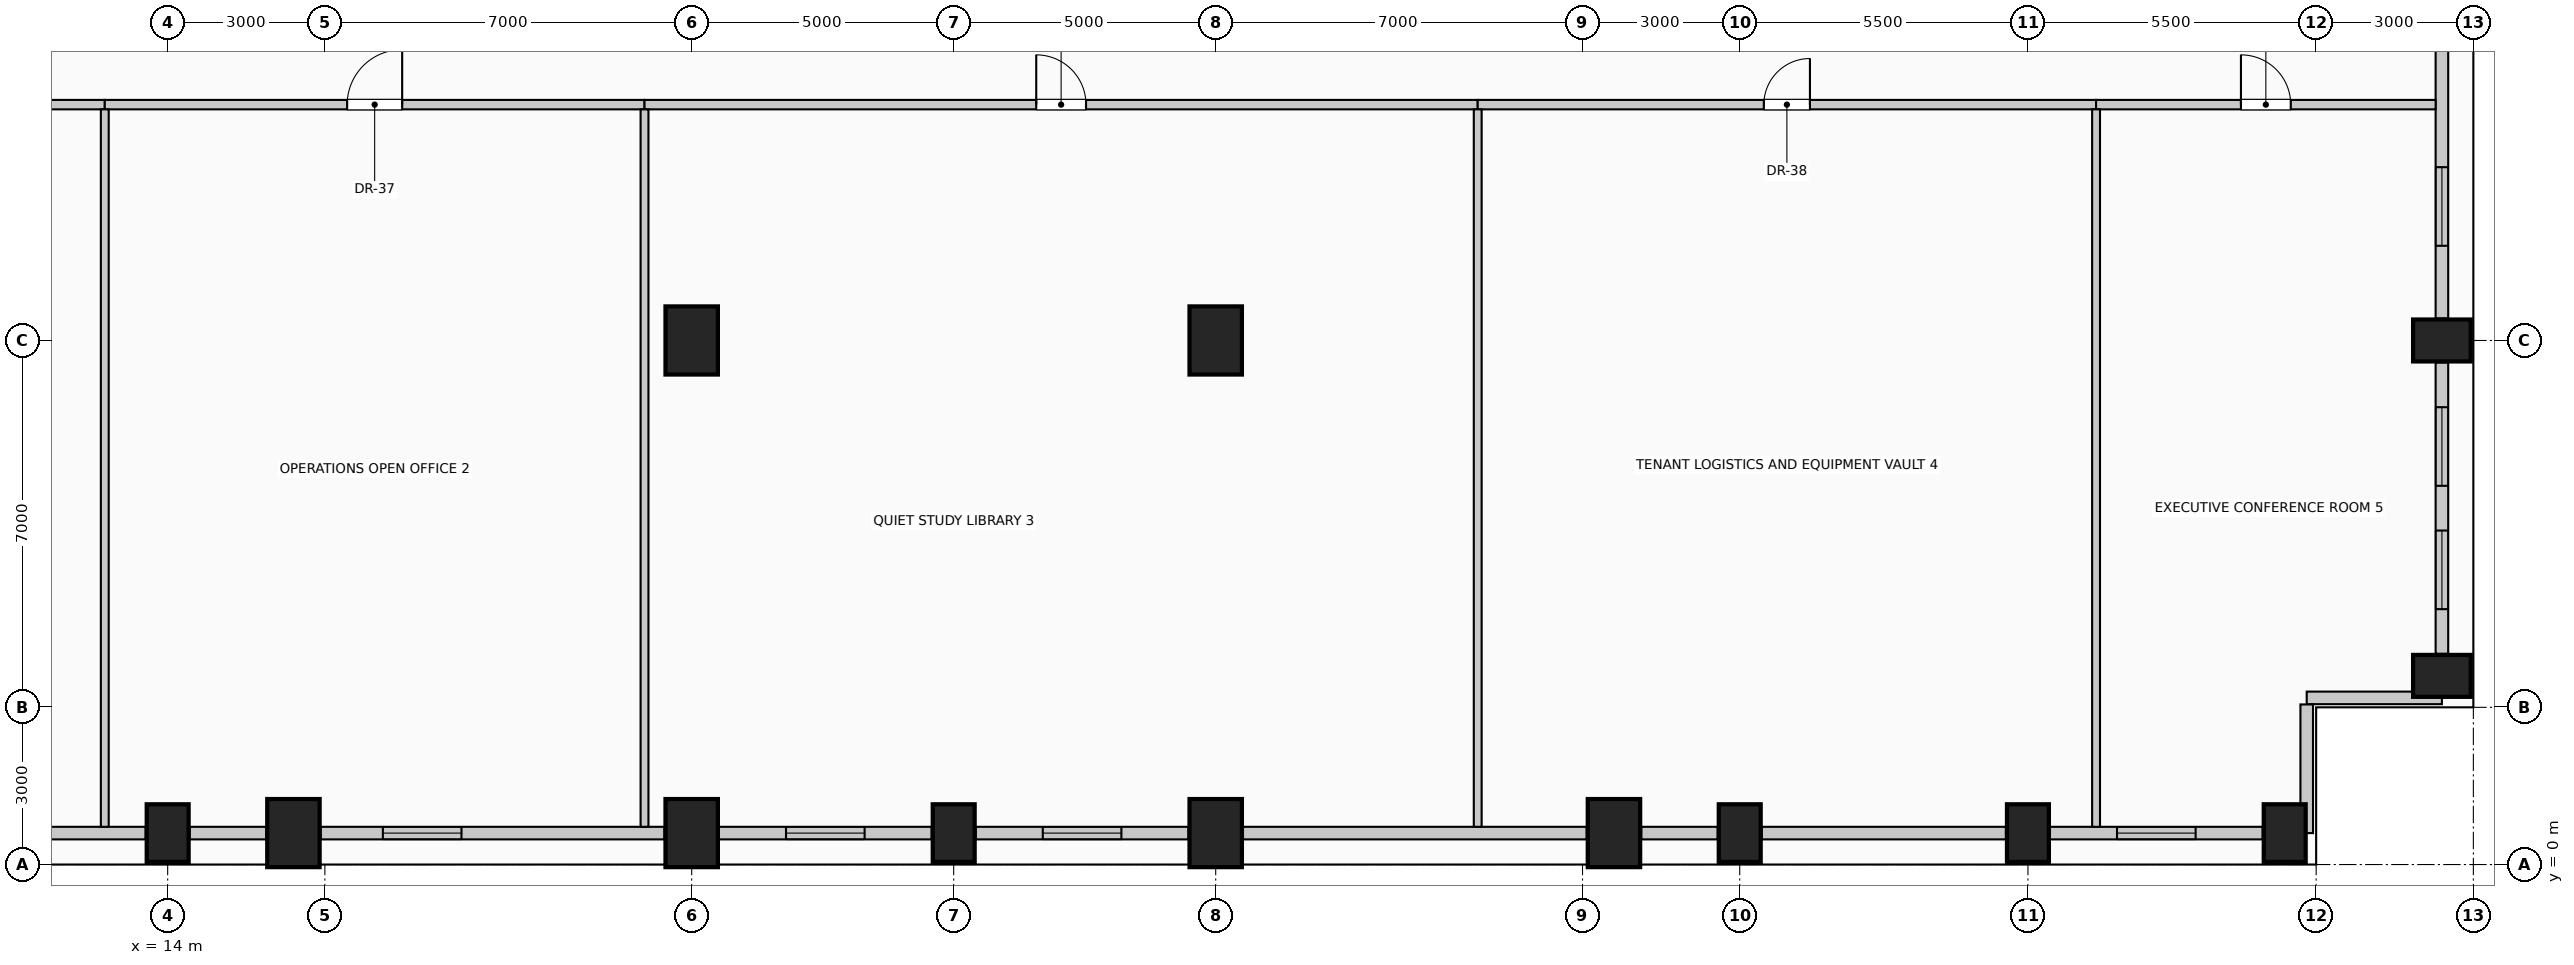
"""IFC4 building model, lengths in metres.
Left out: names, types, materials, properties, quantities, classifications, styles, units other than length and angle.
Written with IfcOpenShell. Run it as: python <this file> out.ifc"""

import sys

from ifc_helpers import new_model, si_unit, direction, frame, frame_2d, origin, origin_2d, place, context, subcontext, project, spatial, rectangle, extrude, element, fill, save


model = new_model("IFC4")
c1 = context("Model", 3, precision=1e-05, world=origin(), true_north=direction((0.0, 1.0)))
c2 = subcontext(c1, "Body", "Model", "MODEL_VIEW")
j1 = project(units=[si_unit("LENGTHUNIT", "METRE"), si_unit("PLANEANGLEUNIT", "RADIAN")], contexts=[c1])
p1 = place(None, origin())
s1 = spatial("IfcSite", under=j1, at=p1, CompositionType="ELEMENT")
p2 = place(p1, origin())
s2 = spatial("IfcBuilding", under=s1, at=p2, CompositionType="ELEMENT")
p3 = place(p2, frame((0.0, 0.0, 218.6)))
s3 = spatial("IfcBuildingStorey", under=s2, at=p3, CompositionType="ELEMENT", Elevation=218.6)
p4 = place(p3, frame((14.0, 0.6, 0.0), z_axis=(0.0, 0.0, 1.0), x_axis=(1.0, 0.0, 0.0)))
e1 = element("IfcColumn", 1, at=p4, inside=s3, PredefinedType="COLUMN", context=c2, shape_type="SweptSolid", body=[
    extrude(rectangle(XDim=0.8, YDim=1.1, at=origin_2d()), origin(), (0.0, 0.0, 1.0), 4.0),
])
for number, where, z_axis, x_axis in (
    (2, (16.4, 0.6, 0.0), (0.0, 0.0, 1.0), (1.0, 0.0, 0.0)),
    (3, (24.0, 0.6, 0.0), (0.0, 0.0, 1.0), (1.0, 0.0, 0.0)),
):
    element("IfcColumn", number, at=place(p3, frame(where, z_axis=z_axis, x_axis=x_axis)), inside=s3, PredefinedType="COLUMN", context=c2, shape_type="SweptSolid", body=[
        extrude(rectangle(XDim=1.0, YDim=1.3, at=origin_2d()), origin(), (0.0, 0.0, 1.0), 4.0),
    ])
p5 = place(p3, frame((29.0, 0.6, 0.0), z_axis=(0.0, 0.0, 1.0), x_axis=(1.0, 0.0, 0.0)))
e4 = element("IfcColumn", 4, at=p5, inside=s3, PredefinedType="COLUMN", context=c2, shape_type="SweptSolid", body=[
    extrude(rectangle(XDim=0.8, YDim=1.1, at=origin_2d()), origin(), (0.0, 0.0, 1.0), 4.0),
])
for number, where, z_axis, x_axis in (
    (5, (34.0, 0.6, 0.0), (0.0, 0.0, 1.0), (1.0, 0.0, 0.0)),
    (6, (41.6, 0.6, 0.0), (0.0, 0.0, 1.0), (1.0, 0.0, 0.0)),
):
    element("IfcColumn", number, at=place(p3, frame(where, z_axis=z_axis, x_axis=x_axis)), inside=s3, PredefinedType="COLUMN", context=c2, shape_type="SweptSolid", body=[
        extrude(rectangle(XDim=1.0, YDim=1.3, at=origin_2d()), origin(), (0.0, 0.0, 1.0), 4.0),
    ])
for number, where, z_axis, x_axis in (
    (7, (44.0, 0.6, 0.0), (0.0, 0.0, 1.0), (1.0, 0.0, 0.0)),
    (8, (49.5, 0.6, 0.0), (0.0, 0.0, 1.0), (1.0, 0.0, 0.0)),
    (9, (54.4, 0.6, 0.0), (0.0, 0.0, 1.0), (1.0, 0.0, 0.0)),
    (10, (57.4, 3.6, 0.0), (0.0, 0.0, 1.0), (0.0, 1.0, 0.0)),
    (11, (57.4, 10.0, 0.0), (0.0, 0.0, 1.0), (0.0, 1.0, 0.0)),
):
    element("IfcColumn", number, at=place(p3, frame(where, z_axis=z_axis, x_axis=x_axis)), inside=s3, PredefinedType="COLUMN", context=c2, shape_type="SweptSolid", body=[
        extrude(rectangle(XDim=0.8, YDim=1.1, at=origin_2d()), origin(), (0.0, 0.0, 1.0), 4.0),
    ])
for number, where, z_axis, x_axis in (
    (12, (24.0, 10.0, 0.0), (0.0, 0.0, 1.0), (1.0, 0.0, 0.0)),
    (13, (34.0, 10.0, 0.0), (0.0, 0.0, 1.0), (1.0, 0.0, 0.0)),
):
    element("IfcColumn", number, at=place(p3, frame(where, z_axis=z_axis, x_axis=x_axis)), inside=s3, PredefinedType="COLUMN", context=c2, shape_type="SweptSolid", body=[
        extrude(rectangle(XDim=1.0, YDim=1.3, at=origin_2d()), origin(), (0.0, 0.0, 1.0), 4.0),
    ])
p6 = place(p3, frame((13.58, 0.6, 0.0), z_axis=(0.0, 0.0, 1.0), x_axis=(-1.0, 0.0, 0.0)))
e14 = element("IfcWall", 14, at=p6, inside=s3, PredefinedType="SOLIDWALL", context=c2, shape_type="SweptSolid", body=[
    extrude(rectangle(XDim=4.66, YDim=0.24, at=frame_2d((2.33, 0.0))), origin(), (0.0, 0.0, 1.0), 3.0),
])
p7 = place(p3, frame((15.88, 0.6, 0.0), z_axis=(0.0, 0.0, 1.0), x_axis=(-1.0, 0.0, 0.0)))
e15 = element("IfcWall", 15, at=p7, inside=s3, PredefinedType="SOLIDWALL", context=c2, shape_type="SweptSolid", body=[
    extrude(rectangle(XDim=1.46, YDim=0.24, at=frame_2d((0.73, 0.0))), origin(), (0.0, 0.0, 1.0), 3.0),
])
p8 = place(p3, frame((23.48, 0.6, 0.0), z_axis=(0.0, 0.0, 1.0), x_axis=(-1.0, 0.0, 0.0)))
e16 = element("IfcWall", 16, at=p8, inside=s3, PredefinedType="SOLIDWALL", context=c2, shape_type="SweptSolid", body=[
    extrude(rectangle(XDim=6.56, YDim=0.24, at=frame_2d((3.28, 0.0))), origin(), (0.0, 0.0, 1.0), 3.0),
])
p9 = place(p8, frame((3.873, 0.0, 0.42)))
e17 = element("IfcOpeningElement", 17, at=p9, cuts=e16, PredefinedType="OPENING", context=c2, shape_type="SweptSolid", body=[
    extrude(rectangle(XDim=1.5, YDim=2.2, at=frame_2d((0.75, 1.1))), frame((0.0, 0.13, 0.0), z_axis=(0.0, -1.0, 0.0), x_axis=(1.0, 0.0, 0.0)), (0.0, 0.0, 1.0), 0.26),
])
p10 = place(p3, frame((28.58, 0.6, 0.0), z_axis=(0.0, 0.0, 1.0), x_axis=(-1.0, 0.0, 0.0)))
e18 = element("IfcWall", 18, at=p10, inside=s3, PredefinedType="SOLIDWALL", context=c2, shape_type="SweptSolid", body=[
    extrude(rectangle(XDim=4.06, YDim=0.24, at=frame_2d((2.03, 0.0))), origin(), (0.0, 0.0, 1.0), 3.0),
])
p11 = place(p10, frame((1.28, 0.0, 0.42)))
e19 = element("IfcOpeningElement", 19, at=p11, cuts=e18, PredefinedType="OPENING", context=c2, shape_type="SweptSolid", body=[
    extrude(rectangle(XDim=1.5, YDim=2.2, at=frame_2d((0.75, 1.1))), frame((0.0, 0.13, 0.0), z_axis=(0.0, -1.0, 0.0), x_axis=(1.0, 0.0, 0.0)), (0.0, 0.0, 1.0), 0.26),
])
p12 = place(p3, frame((33.48, 0.6, 0.0), z_axis=(0.0, 0.0, 1.0), x_axis=(-1.0, 0.0, 0.0)))
e20 = element("IfcWall", 20, at=p12, inside=s3, PredefinedType="SOLIDWALL", context=c2, shape_type="SweptSolid", body=[
    extrude(rectangle(XDim=4.06, YDim=0.24, at=frame_2d((2.03, 0.0))), origin(), (0.0, 0.0, 1.0), 3.0),
])
p13 = place(p12, frame((1.28, 0.0, 0.42)))
e21 = element("IfcOpeningElement", 21, at=p13, cuts=e20, PredefinedType="OPENING", context=c2, shape_type="SweptSolid", body=[
    extrude(rectangle(XDim=1.5, YDim=2.2, at=frame_2d((0.75, 1.1))), frame((0.0, 0.13, 0.0), z_axis=(0.0, -1.0, 0.0), x_axis=(1.0, 0.0, 0.0)), (0.0, 0.0, 1.0), 0.26),
])
p14 = place(p3, frame((41.08, 0.6, 0.0), z_axis=(0.0, 0.0, 1.0), x_axis=(-1.0, 0.0, 0.0)))
e22 = element("IfcWall", 22, at=p14, inside=s3, PredefinedType="SOLIDWALL", context=c2, shape_type="SweptSolid", body=[
    extrude(rectangle(XDim=6.56, YDim=0.24, at=frame_2d((3.28, 0.0))), origin(), (0.0, 0.0, 1.0), 3.0),
])
p15 = place(p3, frame((43.58, 0.6, 0.0), z_axis=(0.0, 0.0, 1.0), x_axis=(-1.0, 0.0, 0.0)))
e23 = element("IfcWall", 23, at=p15, inside=s3, PredefinedType="SOLIDWALL", context=c2, shape_type="SweptSolid", body=[
    extrude(rectangle(XDim=1.46, YDim=0.24, at=frame_2d((0.73, 0.0))), origin(), (0.0, 0.0, 1.0), 3.0),
])
p16 = place(p3, frame((49.08, 0.6, 0.0), z_axis=(0.0, 0.0, 1.0), x_axis=(-1.0, 0.0, 0.0)))
e24 = element("IfcWall", 24, at=p16, inside=s3, PredefinedType="SOLIDWALL", context=c2, shape_type="SweptSolid", body=[
    extrude(rectangle(XDim=4.66, YDim=0.24, at=frame_2d((2.33, 0.0))), origin(), (0.0, 0.0, 1.0), 3.0),
])
p17 = place(p3, frame((53.98, 0.6, 0.0), z_axis=(0.0, 0.0, 1.0), x_axis=(-1.0, 0.0, 0.0)))
e25 = element("IfcWall", 25, at=p17, inside=s3, PredefinedType="SOLIDWALL", context=c2, shape_type="SweptSolid", body=[
    extrude(rectangle(XDim=4.06, YDim=0.24, at=frame_2d((2.03, 0.0))), origin(), (0.0, 0.0, 1.0), 3.0),
])
p18 = place(p17, frame((1.28, 0.0, 0.42)))
e26 = element("IfcOpeningElement", 26, at=p18, cuts=e25, PredefinedType="OPENING", context=c2, shape_type="SweptSolid", body=[
    extrude(rectangle(XDim=1.5, YDim=2.2, at=frame_2d((0.75, 1.1))), frame((0.0, 0.13, 0.0), z_axis=(0.0, -1.0, 0.0), x_axis=(1.0, 0.0, 0.0)), (0.0, 0.0, 1.0), 0.26),
])
p19 = place(p3, frame((57.4, 9.58, 0.0), z_axis=(0.0, 0.0, 1.0), x_axis=(0.0, -1.0, 0.0)))
e27 = element("IfcWall", 27, at=p19, inside=s3, PredefinedType="SOLIDWALL", context=c2, shape_type="SweptSolid", body=[
    extrude(rectangle(XDim=5.56, YDim=0.24, at=frame_2d((2.78, 0.0))), origin(), (0.0, 0.0, 1.0), 3.0),
])
p20 = place(p19, frame((0.853, 0.0, 0.42)))
e28 = element("IfcOpeningElement", 28, at=p20, cuts=e27, PredefinedType="OPENING", context=c2, shape_type="SweptSolid", body=[
    extrude(rectangle(XDim=1.5, YDim=2.2, at=frame_2d((0.75, 1.1))), frame((0.0, 0.13, 0.0), z_axis=(0.0, -1.0, 0.0), x_axis=(1.0, 0.0, 0.0)), (0.0, 0.0, 1.0), 0.26),
])
p21 = place(p19, frame((3.207, 0.0, 0.42)))
e29 = element("IfcOpeningElement", 29, at=p21, cuts=e27, PredefinedType="OPENING", context=c2, shape_type="SweptSolid", body=[
    extrude(rectangle(XDim=1.5, YDim=2.2, at=frame_2d((0.75, 1.1))), frame((0.0, 0.13, 0.0), z_axis=(0.0, -1.0, 0.0), x_axis=(1.0, 0.0, 0.0)), (0.0, 0.0, 1.0), 0.26),
])
p22 = place(p3, frame((57.4, 17.58, 0.0), z_axis=(0.0, 0.0, 1.0), x_axis=(0.0, -1.0, 0.0)))
e30 = element("IfcWall", 30, at=p22, inside=s3, PredefinedType="SOLIDWALL", context=c2, shape_type="SweptSolid", body=[
    extrude(rectangle(XDim=7.16, YDim=0.24, at=frame_2d((3.58, 0.0))), origin(), (0.0, 0.0, 1.0), 3.0),
])
p23 = place(p22, frame((4.273, 0.0, 0.42)))
e31 = element("IfcOpeningElement", 31, at=p23, cuts=e30, PredefinedType="OPENING", context=c2, shape_type="SweptSolid", body=[
    extrude(rectangle(XDim=1.5, YDim=2.2, at=frame_2d((0.75, 1.1))), frame((0.0, 0.13, 0.0), z_axis=(0.0, -1.0, 0.0), x_axis=(1.0, 0.0, 0.0)), (0.0, 0.0, 1.0), 0.26),
])
p24 = place(p3, frame((57.4, 3.18, 0.0), z_axis=(0.0, 0.0, 1.0), x_axis=(-1.0, 0.0, 0.0)))
e32 = element("IfcWall", 32, at=p24, inside=s3, PredefinedType="SOLIDWALL", context=c2, shape_type="SweptSolid", body=[
    extrude(rectangle(XDim=2.58, YDim=0.24, at=frame_2d((1.29, 0.0))), origin(), (0.0, 0.0, 1.0), 3.75),
])
p25 = place(p3, frame((54.82, 3.055, 0.0), z_axis=(0.0, 0.0, 1.0), x_axis=(0.0, -1.0, 0.0)))
e33 = element("IfcWall", 33, at=p25, inside=s3, PredefinedType="SOLIDWALL", context=c2, shape_type="SweptSolid", body=[
    extrude(rectangle(XDim=2.455, YDim=0.24, at=frame_2d((1.228, 0.0))), origin(), (0.0, 0.0, 1.0), 3.75),
])
p26 = place(p3, frame((0.72, 14.5, 0.0), z_axis=(0.0, 0.0, 1.0), x_axis=(1.0, 0.0, 0.0)))
e34 = element("IfcWall", 34, at=p26, inside=s3, PredefinedType="PARTITIONING", context=c2, shape_type="SweptSolid", body=[
    extrude(rectangle(XDim=12.08, YDim=0.18, at=frame_2d((6.04, 0.0))), origin(), (0.0, 0.0, 1.0), 3.75),
])
p27 = place(p26, frame((5.565, 0.0, 0.0)))
e35 = element("IfcOpeningElement", 35, at=p27, cuts=e34, PredefinedType="OPENING", context=c2, shape_type="SweptSolid", body=[
    extrude(rectangle(XDim=0.95, YDim=2.15, at=frame_2d((0.475, 1.075))), frame((0.0, 0.1, 0.0), z_axis=(0.0, -1.0, 0.0), x_axis=(1.0, 0.0, 0.0)), (0.0, 0.0, 1.0), 0.2),
])
p28 = place(p3, frame((12.8, 14.5, 0.0), z_axis=(0.0, 0.0, 1.0), x_axis=(1.0, 0.0, 0.0)))
e36 = element("IfcWall", 36, at=p28, inside=s3, PredefinedType="PARTITIONING", context=c2, shape_type="SweptSolid", body=[
    extrude(rectangle(XDim=10.3, YDim=0.18, at=frame_2d((5.15, 0.0))), origin(), (0.0, 0.0, 1.0), 3.75),
])
p29 = place(p28, frame((4.625, 0.0, 0.0)))
e37 = element("IfcOpeningElement", 37, at=p29, cuts=e36, PredefinedType="OPENING", context=c2, shape_type="SweptSolid", body=[
    extrude(rectangle(XDim=1.05, YDim=2.15, at=frame_2d((0.525, 1.075))), frame((0.0, 0.1, 0.0), z_axis=(0.0, -1.0, 0.0), x_axis=(1.0, 0.0, 0.0)), (0.0, 0.0, 1.0), 0.2),
])
p30 = place(p3, frame((23.1, 14.5, 0.0), z_axis=(0.0, 0.0, 1.0), x_axis=(1.0, 0.0, 0.0)))
e38 = element("IfcWall", 38, at=p30, inside=s3, PredefinedType="PARTITIONING", context=c2, shape_type="SweptSolid", body=[
    extrude(rectangle(XDim=15.9, YDim=0.18, at=frame_2d((7.95, 0.0))), origin(), (0.0, 0.0, 1.0), 3.75),
])
p31 = place(p30, frame((7.475, 0.0, 0.0)))
e39 = element("IfcOpeningElement", 39, at=p31, cuts=e38, PredefinedType="OPENING", context=c2, shape_type="SweptSolid", body=[
    extrude(rectangle(XDim=0.95, YDim=2.15, at=frame_2d((0.475, 1.075))), frame((0.0, 0.1, 0.0), z_axis=(0.0, -1.0, 0.0), x_axis=(1.0, 0.0, 0.0)), (0.0, 0.0, 1.0), 0.2),
])
p32 = place(p3, frame((39.0, 14.5, 0.0), z_axis=(0.0, 0.0, 1.0), x_axis=(1.0, 0.0, 0.0)))
e40 = element("IfcWall", 40, at=p32, inside=s3, PredefinedType="PARTITIONING", context=c2, shape_type="SweptSolid", body=[
    extrude(rectangle(XDim=11.8, YDim=0.18, at=frame_2d((5.9, 0.0))), origin(), (0.0, 0.0, 1.0), 3.75),
])
p33 = place(p32, frame((5.46, 0.0, 0.0)))
e41 = element("IfcOpeningElement", 41, at=p33, cuts=e40, PredefinedType="OPENING", context=c2, shape_type="SweptSolid", body=[
    extrude(rectangle(XDim=0.88, YDim=2.1, at=frame_2d((0.44, 1.05))), frame((0.0, 0.1, 0.0), z_axis=(0.0, -1.0, 0.0), x_axis=(1.0, 0.0, 0.0)), (0.0, 0.0, 1.0), 0.2),
])
p34 = place(p3, frame((50.8, 14.5, 0.0), z_axis=(0.0, 0.0, 1.0), x_axis=(1.0, 0.0, 0.0)))
e42 = element("IfcWall", 42, at=p34, inside=s3, PredefinedType="PARTITIONING", context=c2, shape_type="SweptSolid", body=[
    extrude(rectangle(XDim=6.48, YDim=0.18, at=frame_2d((3.24, 0.0))), origin(), (0.0, 0.0, 1.0), 3.75),
])
p35 = place(p34, frame((2.765, 0.0, 0.0)))
e43 = element("IfcOpeningElement", 43, at=p35, cuts=e42, PredefinedType="OPENING", context=c2, shape_type="SweptSolid", body=[
    extrude(rectangle(XDim=0.95, YDim=2.15, at=frame_2d((0.475, 1.075))), frame((0.0, 0.1, 0.0), z_axis=(0.0, -1.0, 0.0), x_axis=(1.0, 0.0, 0.0)), (0.0, 0.0, 1.0), 0.2),
])
for number, where, z_axis, x_axis in (
    (44, (12.8, 0.72, 0.0), (0.0, 0.0, 1.0), (0.0, 1.0, 0.0)),
    (45, (23.1, 0.72, 0.0), (0.0, 0.0, 1.0), (0.0, 1.0, 0.0)),
    (46, (39.0, 0.72, 0.0), (0.0, 0.0, 1.0), (0.0, 1.0, 0.0)),
    (47, (50.8, 0.72, 0.0), (0.0, 0.0, 1.0), (0.0, 1.0, 0.0)),
):
    element("IfcWall", number, at=place(p3, frame(where, z_axis=z_axis, x_axis=x_axis)), inside=s3, PredefinedType="PARTITIONING", context=c2, shape_type="SweptSolid", body=[
        extrude(rectangle(XDim=13.69, YDim=0.15, at=frame_2d((6.845, 0.0))), origin(), (0.0, 0.0, 1.0), 3.75),
    ])
p36 = place(p9, origin())
e48 = element("IfcWindow", 48, at=p36, inside=s3, PartitioningType="SINGLE_PANEL", PredefinedType="WINDOW", context=c2, shape_type="SweptSolid", body=[
    extrude(rectangle(XDim=1.5, YDim=2.2, at=frame_2d((0.75, 1.1))), frame((0.0, 0.03, 0.0), z_axis=(0.0, -1.0, 0.0), x_axis=(1.0, 0.0, 0.0)), (0.0, 0.0, 1.0), 0.06),
])
fill(e17, e48)
p37 = place(p11, origin())
e49 = element("IfcWindow", 49, at=p37, inside=s3, PartitioningType="SINGLE_PANEL", PredefinedType="WINDOW", context=c2, shape_type="SweptSolid", body=[
    extrude(rectangle(XDim=1.5, YDim=2.2, at=frame_2d((0.75, 1.1))), frame((0.0, 0.03, 0.0), z_axis=(0.0, -1.0, 0.0), x_axis=(1.0, 0.0, 0.0)), (0.0, 0.0, 1.0), 0.06),
])
fill(e19, e49)
p38 = place(p13, origin())
e50 = element("IfcWindow", 50, at=p38, inside=s3, PartitioningType="SINGLE_PANEL", PredefinedType="WINDOW", context=c2, shape_type="SweptSolid", body=[
    extrude(rectangle(XDim=1.5, YDim=2.2, at=frame_2d((0.75, 1.1))), frame((0.0, 0.03, 0.0), z_axis=(0.0, -1.0, 0.0), x_axis=(1.0, 0.0, 0.0)), (0.0, 0.0, 1.0), 0.06),
])
fill(e21, e50)
p39 = place(p18, origin())
e51 = element("IfcWindow", 51, at=p39, inside=s3, PartitioningType="SINGLE_PANEL", PredefinedType="WINDOW", context=c2, shape_type="SweptSolid", body=[
    extrude(rectangle(XDim=1.5, YDim=2.2, at=frame_2d((0.75, 1.1))), frame((0.0, 0.03, 0.0), z_axis=(0.0, -1.0, 0.0), x_axis=(1.0, 0.0, 0.0)), (0.0, 0.0, 1.0), 0.06),
])
fill(e26, e51)
p40 = place(p20, origin())
e52 = element("IfcWindow", 52, at=p40, inside=s3, PartitioningType="SINGLE_PANEL", PredefinedType="WINDOW", context=c2, shape_type="SweptSolid", body=[
    extrude(rectangle(XDim=1.5, YDim=2.2, at=frame_2d((0.75, 1.1))), frame((0.0, 0.03, 0.0), z_axis=(0.0, -1.0, 0.0), x_axis=(1.0, 0.0, 0.0)), (0.0, 0.0, 1.0), 0.06),
])
fill(e28, e52)
p41 = place(p21, origin())
e53 = element("IfcWindow", 53, at=p41, inside=s3, PartitioningType="SINGLE_PANEL", PredefinedType="WINDOW", context=c2, shape_type="SweptSolid", body=[
    extrude(rectangle(XDim=1.5, YDim=2.2, at=frame_2d((0.75, 1.1))), frame((0.0, 0.03, 0.0), z_axis=(0.0, -1.0, 0.0), x_axis=(1.0, 0.0, 0.0)), (0.0, 0.0, 1.0), 0.06),
])
fill(e29, e53)
p42 = place(p23, origin())
e54 = element("IfcWindow", 54, at=p42, inside=s3, PartitioningType="SINGLE_PANEL", PredefinedType="WINDOW", context=c2, shape_type="SweptSolid", body=[
    extrude(rectangle(XDim=1.5, YDim=2.2, at=frame_2d((0.75, 1.1))), frame((0.0, 0.03, 0.0), z_axis=(0.0, -1.0, 0.0), x_axis=(1.0, 0.0, 0.0)), (0.0, 0.0, 1.0), 0.06),
])
fill(e31, e54)
p43 = place(p29, origin())
e55 = element("IfcDoor", 55, at=p43, inside=s3, OperationType="SINGLE_SWING_RIGHT", PredefinedType="DOOR", context=c2, shape_type="SweptSolid", body=[
    extrude(rectangle(XDim=1.05, YDim=2.15, at=frame_2d((0.525, 1.075))), frame((0.0, 0.025, 0.0), z_axis=(0.0, -1.0, 0.0), x_axis=(1.0, 0.0, 0.0)), (0.0, 0.0, 1.0), 0.05),
])
fill(e37, e55)
p44 = place(p31, origin())
e56 = element("IfcDoor", 56, at=p44, inside=s3, OperationType="SINGLE_SWING_LEFT", PredefinedType="DOOR", context=c2, shape_type="SweptSolid", body=[
    extrude(rectangle(XDim=0.95, YDim=2.15, at=frame_2d((0.475, 1.075))), frame((0.0, 0.025, 0.0), z_axis=(0.0, -1.0, 0.0), x_axis=(1.0, 0.0, 0.0)), (0.0, 0.0, 1.0), 0.05),
])
fill(e39, e56)
p45 = place(p33, origin())
e57 = element("IfcDoor", 57, at=p45, inside=s3, OperationType="SINGLE_SWING_RIGHT", PredefinedType="DOOR", context=c2, shape_type="SweptSolid", body=[
    extrude(rectangle(XDim=0.88, YDim=2.1, at=frame_2d((0.44, 1.05))), frame((0.0, 0.025, 0.0), z_axis=(0.0, -1.0, 0.0), x_axis=(1.0, 0.0, 0.0)), (0.0, 0.0, 1.0), 0.05),
])
fill(e41, e57)
p46 = place(p35, origin())
e58 = element("IfcDoor", 58, at=p46, inside=s3, OperationType="SINGLE_SWING_LEFT", PredefinedType="DOOR", context=c2, shape_type="SweptSolid", body=[
    extrude(rectangle(XDim=0.95, YDim=2.15, at=frame_2d((0.475, 1.075))), frame((0.0, 0.025, 0.0), z_axis=(0.0, -1.0, 0.0), x_axis=(1.0, 0.0, 0.0)), (0.0, 0.0, 1.0), 0.05),
])
fill(e43, e58)
save(model, sys.argv[1])
